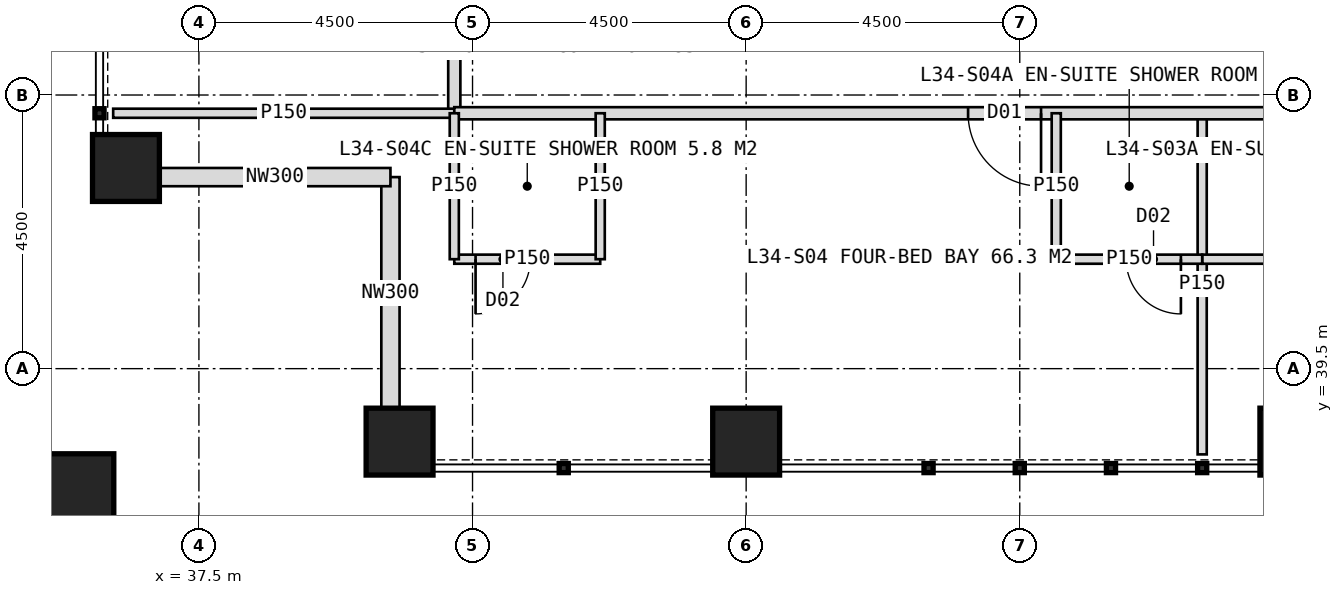
"""IFC4 building model, lengths in metres.
Left out: names, types, materials, properties, quantities, classifications, styles, units other than length and angle.
Written with IfcOpenShell. Run it as: python <this file> out.ifc"""

import sys

from ifc_helpers import new_model, si_unit, direction, frame, frame_2d, origin, origin_2d, place, context, subcontext, project, spatial, rectangle, hollow_rectangle, extrude, element, fill, save


model = new_model("IFC4")
c1 = context("Model", 3, precision=1e-05, world=origin(), true_north=direction((0.0, 1.0)))
c2 = subcontext(c1, "Body", "Model", "MODEL_VIEW")
j1 = project(units=[si_unit("LENGTHUNIT", "METRE"), si_unit("PLANEANGLEUNIT", "RADIAN")], contexts=[c1])
p1 = place(None, origin())
s1 = spatial("IfcSite", under=j1, at=p1, CompositionType="ELEMENT")
p2 = place(p1, origin())
s2 = spatial("IfcBuilding", under=s1, at=p2, CompositionType="ELEMENT")
p3 = place(p2, frame((0.0, 0.0, 144.0)))
s3 = spatial("IfcBuildingStorey", under=s2, at=p3, CompositionType="ELEMENT", Elevation=144.0)
for number, where, z_axis, x_axis in (
    (1, (40.8, 38.3, 0.0), (0.0, 0.0, 1.0), (1.0, 0.0, 0.0)),
    (2, (36.3, 42.8, 0.0), (0.0, 0.0, 1.0), (1.0, 0.0, 0.0)),
    (3, (46.5, 38.3, 0.0), (0.0, 0.0, 1.0), (1.0, 0.0, 0.0)),
    (4, (55.5, 38.3, 0.0), (0.0, 0.0, 1.0), (1.0, 0.0, 0.0)),
):
    element("IfcColumn", number, at=place(p3, frame(where, z_axis=z_axis, x_axis=x_axis)), inside=s3, PredefinedType="COLUMN", context=c2, shape_type="SweptSolid", body=[
        extrude(hollow_rectangle(XDim=1.1, YDim=1.1, WallThickness=0.1, at=origin_2d()), origin(), (0.0, 0.0, 1.0), 4.0),
    ])
p4 = place(p3, frame((35.4, 37.4, 0.0), z_axis=(0.0, 0.0, 1.0), x_axis=(1.0, 0.0, 0.0)))
e5 = element("IfcColumn", 5, at=p4, inside=s3, PredefinedType="COLUMN", context=c2, shape_type="SweptSolid", body=[
    extrude(hollow_rectangle(XDim=1.4, YDim=1.4, WallThickness=0.08, at=origin_2d()), origin(), (0.0, 0.0, 1.0), 4.0),
])
for number, where, z_axis, x_axis in (
    (6, (40.65, 38.85, 0.0), (0.0, 0.0, 1.0), (0.0, 1.0, 0.0)),
    (7, (40.65, 42.65, 0.0), (0.0, 0.0, 1.0), (-1.0, 0.0, 0.0)),
):
    element("IfcWall", number, at=place(p3, frame(where, z_axis=z_axis, x_axis=x_axis)), inside=s3, PredefinedType="ELEMENTEDWALL", context=c2, shape_type="SweptSolid", body=[
        extrude(rectangle(XDim=3.8, YDim=0.3, at=frame_2d((1.9, 0.0))), origin(), (0.0, 0.0, 1.0), 4.0),
    ])
p5 = place(p3, frame((41.7, 43.7, 0.0), z_axis=(0.0, 0.0, 1.0), x_axis=(0.0, 1.0, 0.0)))
e8 = element("IfcWall", 8, at=p5, inside=s3, PredefinedType="PARTITIONING", context=c2, shape_type="SweptSolid", body=[
    extrude(rectangle(XDim=36.6, YDim=0.2, at=frame_2d((18.3, 0.0))), origin(), (0.0, 0.0, 1.0), 3.75),
])
p6 = place(p5, frame((3.35, 0.0, 0.0)))
e9 = element("IfcOpeningElement", 9, at=p6, cuts=e8, PredefinedType="OPENING", context=c2, shape_type="SweptSolid", body=[
    extrude(rectangle(XDim=1.2, YDim=2.2, at=frame_2d((0.6, 1.1))), frame((0.0, 0.11, 0.0), z_axis=(0.0, -1.0, 0.0), x_axis=(1.0, 0.0, 0.0)), (0.0, 0.0, 1.0), 0.22),
])
p7 = place(p5, frame((11.05, 0.0, 0.0)))
e10 = element("IfcOpeningElement", 10, at=p7, cuts=e8, PredefinedType="OPENING", context=c2, shape_type="SweptSolid", body=[
    extrude(rectangle(XDim=1.2, YDim=2.2, at=frame_2d((0.6, 1.1))), frame((0.0, 0.11, 0.0), z_axis=(0.0, -1.0, 0.0), x_axis=(1.0, 0.0, 0.0)), (0.0, 0.0, 1.0), 0.22),
])
p8 = place(p5, frame((16.3, 0.0, 0.0)))
e11 = element("IfcOpeningElement", 11, at=p8, cuts=e8, PredefinedType="OPENING", context=c2, shape_type="SweptSolid", body=[
    extrude(rectangle(XDim=1.0, YDim=2.1, at=frame_2d((0.5, 1.05))), frame((0.0, 0.11, 0.0), z_axis=(0.0, -1.0, 0.0), x_axis=(1.0, 0.0, 0.0)), (0.0, 0.0, 1.0), 0.22),
])
p9 = place(p5, frame((20.95, 0.0, 0.0)))
e12 = element("IfcOpeningElement", 12, at=p9, cuts=e8, PredefinedType="OPENING", context=c2, shape_type="SweptSolid", body=[
    extrude(rectangle(XDim=1.2, YDim=2.2, at=frame_2d((0.6, 1.1))), frame((0.0, 0.11, 0.0), z_axis=(0.0, -1.0, 0.0), x_axis=(1.0, 0.0, 0.0)), (0.0, 0.0, 1.0), 0.22),
])
p10 = place(p5, frame((32.75, 0.0, 0.0)))
e13 = element("IfcOpeningElement", 13, at=p10, cuts=e8, PredefinedType="OPENING", context=c2, shape_type="SweptSolid", body=[
    extrude(rectangle(XDim=1.2, YDim=2.2, at=frame_2d((0.6, 1.1))), frame((0.0, 0.11, 0.0), z_axis=(0.0, -1.0, 0.0), x_axis=(1.0, 0.0, 0.0)), (0.0, 0.0, 1.0), 0.22),
])
for number, where, z_axis, x_axis in (
    (14, (41.7, 43.7, 0.0), (0.0, 0.0, 1.0), (-1.0, 0.0, 0.0)),
    (15, (54.0, 43.7, 0.0), (0.0, 0.0, 1.0), (0.0, -1.0, 0.0)),
):
    element("IfcWall", number, at=place(p3, frame(where, z_axis=z_axis, x_axis=x_axis)), inside=s3, PredefinedType="PARTITIONING", context=c2, shape_type="SweptSolid", body=[
        extrude(rectangle(XDim=5.61, YDim=0.15, at=frame_2d((2.805, 0.0))), origin(), (0.0, 0.0, 1.0), 3.75),
    ])
p11 = place(p3, frame((78.3, 43.7, 0.0), z_axis=(0.0, 0.0, 1.0), x_axis=(-1.0, 0.0, 0.0)))
e16 = element("IfcWall", 16, at=p11, inside=s3, PredefinedType="PARTITIONING", context=c2, shape_type="SweptSolid", body=[
    extrude(rectangle(XDim=36.6, YDim=0.2, at=frame_2d((18.3, 0.0))), origin(), (0.0, 0.0, 1.0), 3.75),
])
p12 = place(p11, frame((3.35, 0.0, 0.0)))
e17 = element("IfcOpeningElement", 17, at=p12, cuts=e16, PredefinedType="OPENING", context=c2, shape_type="SweptSolid", body=[
    extrude(rectangle(XDim=1.2, YDim=2.2, at=frame_2d((0.6, 1.1))), frame((0.0, 0.11, 0.0), z_axis=(0.0, -1.0, 0.0), x_axis=(1.0, 0.0, 0.0)), (0.0, 0.0, 1.0), 0.22),
])
p13 = place(p11, frame((11.05, 0.0, 0.0)))
e18 = element("IfcOpeningElement", 18, at=p13, cuts=e16, PredefinedType="OPENING", context=c2, shape_type="SweptSolid", body=[
    extrude(rectangle(XDim=1.2, YDim=2.2, at=frame_2d((0.6, 1.1))), frame((0.0, 0.11, 0.0), z_axis=(0.0, -1.0, 0.0), x_axis=(1.0, 0.0, 0.0)), (0.0, 0.0, 1.0), 0.22),
])
p14 = place(p11, frame((19.85, 0.0, 0.0)))
e19 = element("IfcOpeningElement", 19, at=p14, cuts=e16, PredefinedType="OPENING", context=c2, shape_type="SweptSolid", body=[
    extrude(rectangle(XDim=1.2, YDim=2.2, at=frame_2d((0.6, 1.1))), frame((0.0, 0.11, 0.0), z_axis=(0.0, -1.0, 0.0), x_axis=(1.0, 0.0, 0.0)), (0.0, 0.0, 1.0), 0.22),
])
p15 = place(p11, frame((26.95, 0.0, 0.0)))
e20 = element("IfcOpeningElement", 20, at=p15, cuts=e16, PredefinedType="OPENING", context=c2, shape_type="SweptSolid", body=[
    extrude(rectangle(XDim=1.2, YDim=2.2, at=frame_2d((0.6, 1.1))), frame((0.0, 0.11, 0.0), z_axis=(0.0, -1.0, 0.0), x_axis=(1.0, 0.0, 0.0)), (0.0, 0.0, 1.0), 0.22),
])
p16 = place(p3, frame((57.0, 41.3, 0.0), z_axis=(0.0, 0.0, 1.0), x_axis=(-1.0, 0.0, 0.0)))
e21 = element("IfcWall", 21, at=p16, inside=s3, PredefinedType="PARTITIONING", context=c2, shape_type="SweptSolid", body=[
    extrude(rectangle(XDim=3.0, YDim=0.15, at=frame_2d((1.5, 0.0))), origin(), (0.0, 0.0, 1.0), 3.75),
])
p17 = place(p16, frame((0.35, 0.0, 0.0)))
e22 = element("IfcOpeningElement", 22, at=p17, cuts=e21, PredefinedType="OPENING", context=c2, shape_type="SweptSolid", body=[
    extrude(rectangle(XDim=0.9, YDim=2.1, at=frame_2d((0.45, 1.05))), frame((0.0, 0.085, 0.0), z_axis=(0.0, -1.0, 0.0), x_axis=(1.0, 0.0, 0.0)), (0.0, 0.0, 1.0), 0.17),
])
p18 = place(p3, frame((54.0, 41.3, 0.0), z_axis=(0.0, 0.0, 1.0), x_axis=(-1.0, 0.0, 0.0)))
e23 = element("IfcWall", 23, at=p18, inside=s3, PredefinedType="PARTITIONING", context=c2, shape_type="SweptSolid", body=[
    extrude(rectangle(XDim=2.4, YDim=0.15, at=frame_2d((1.2, 0.0))), origin(), (0.0, 0.0, 1.0), 3.75),
])
p19 = place(p18, frame((0.35, 0.0, 0.0)))
e24 = element("IfcOpeningElement", 24, at=p19, cuts=e23, PredefinedType="OPENING", context=c2, shape_type="SweptSolid", body=[
    extrude(rectangle(XDim=0.9, YDim=2.1, at=frame_2d((0.45, 1.05))), frame((0.0, 0.085, 0.0), z_axis=(0.0, -1.0, 0.0), x_axis=(1.0, 0.0, 0.0)), (0.0, 0.0, 1.0), 0.17),
])
p20 = place(p3, frame((51.6, 43.7, 0.0), z_axis=(0.0, 0.0, 1.0), x_axis=(0.0, -1.0, 0.0)))
e25 = element("IfcWall", 25, at=p20, inside=s3, PredefinedType="PARTITIONING", context=c2, shape_type="SweptSolid", body=[
    extrude(rectangle(XDim=2.4, YDim=0.15, at=frame_2d((1.2, 0.0))), origin(), (0.0, 0.0, 1.0), 3.75),
])
p21 = place(p3, frame((44.1, 41.3, 0.0), z_axis=(0.0, 0.0, 1.0), x_axis=(-1.0, 0.0, 0.0)))
e26 = element("IfcWall", 26, at=p21, inside=s3, PredefinedType="PARTITIONING", context=c2, shape_type="SweptSolid", body=[
    extrude(rectangle(XDim=2.4, YDim=0.15, at=frame_2d((1.2, 0.0))), origin(), (0.0, 0.0, 1.0), 3.75),
])
p22 = place(p21, frame((1.15, 0.0, 0.0)))
e27 = element("IfcOpeningElement", 27, at=p22, cuts=e26, PredefinedType="OPENING", context=c2, shape_type="SweptSolid", body=[
    extrude(rectangle(XDim=0.9, YDim=2.1, at=frame_2d((0.45, 1.05))), frame((0.0, 0.085, 0.0), z_axis=(0.0, -1.0, 0.0), x_axis=(1.0, 0.0, 0.0)), (0.0, 0.0, 1.0), 0.17),
])
for number, where, z_axis, x_axis in (
    (28, (44.1, 43.7, 0.0), (0.0, 0.0, 1.0), (0.0, -1.0, 0.0)),
    (29, (41.7, 43.7, 0.0), (0.0, 0.0, 1.0), (0.0, -1.0, 0.0)),
):
    element("IfcWall", number, at=place(p3, frame(where, z_axis=z_axis, x_axis=x_axis)), inside=s3, PredefinedType="PARTITIONING", context=c2, shape_type="SweptSolid", body=[
        extrude(rectangle(XDim=2.4, YDim=0.15, at=frame_2d((1.2, 0.0))), origin(), (0.0, 0.0, 1.0), 3.75),
    ])
p23 = place(p15, origin())
e30 = element("IfcDoor", 30, at=p23, inside=s3, OperationType="SINGLE_SWING_LEFT", PredefinedType="DOOR", context=c2, shape_type="SweptSolid", body=[
    extrude(rectangle(XDim=1.2, YDim=2.2, at=frame_2d((0.6, 1.1))), frame((0.0, 0.025, 0.0), z_axis=(0.0, -1.0, 0.0), x_axis=(1.0, 0.0, 0.0)), (0.0, 0.0, 1.0), 0.05),
])
fill(e20, e30)
p24 = place(p19, origin())
e31 = element("IfcDoor", 31, at=p24, inside=s3, OperationType="SINGLE_SWING_LEFT", PredefinedType="DOOR", context=c2, shape_type="SweptSolid", body=[
    extrude(rectangle(XDim=0.9, YDim=2.1, at=frame_2d((0.45, 1.05))), frame((0.0, 0.025, 0.0), z_axis=(0.0, -1.0, 0.0), x_axis=(1.0, 0.0, 0.0)), (0.0, 0.0, 1.0), 0.05),
])
fill(e24, e31)
p25 = place(p22, origin())
e32 = element("IfcDoor", 32, at=p25, inside=s3, OperationType="SINGLE_SWING_RIGHT", PredefinedType="DOOR", context=c2, shape_type="SweptSolid", body=[
    extrude(rectangle(XDim=0.9, YDim=2.1, at=frame_2d((0.45, 1.05))), frame((0.0, 0.025, 0.0), z_axis=(0.0, -1.0, 0.0), x_axis=(1.0, 0.0, 0.0)), (0.0, 0.0, 1.0), 0.05),
])
fill(e27, e32)
save(model, sys.argv[1])
